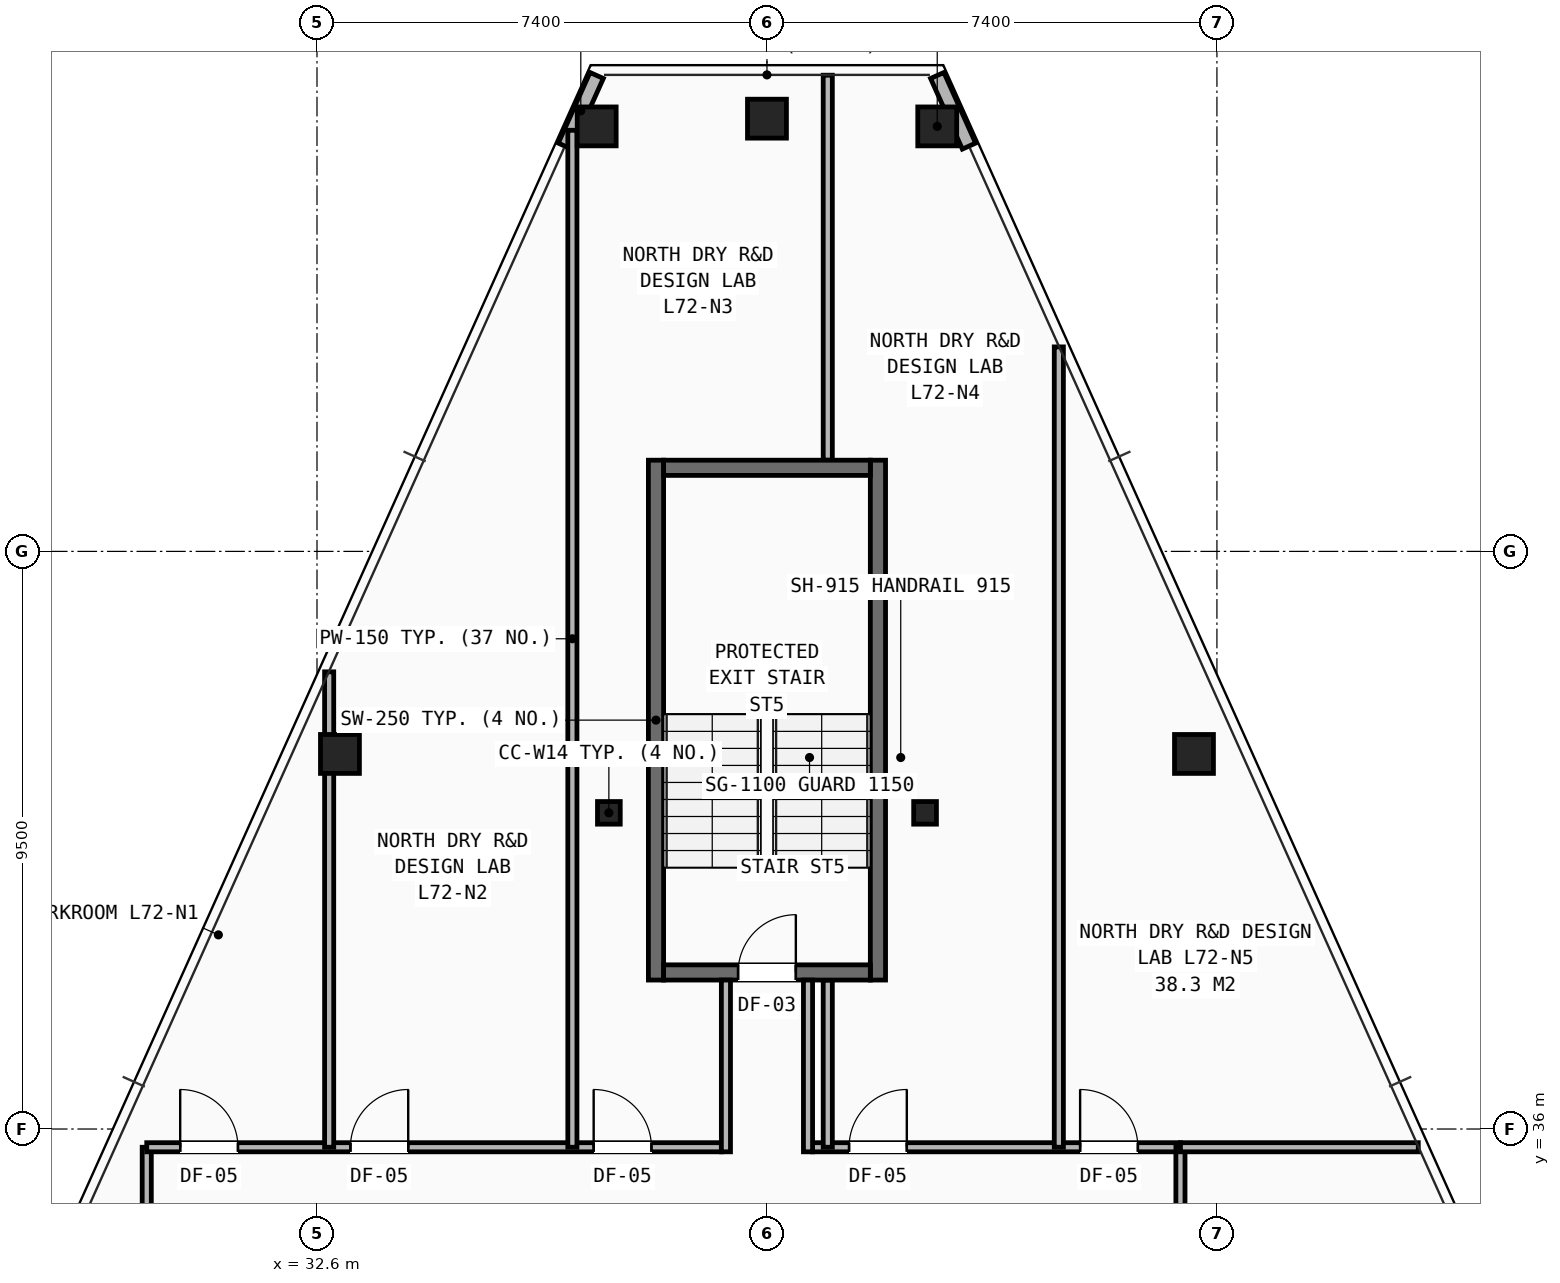
"""IFC4 building model, lengths in metres.
Left out: names, types, materials, properties, quantities, classifications, styles, units other than length and angle.
Written with IfcOpenShell. Run it as: python <this file> out.ifc"""

import sys

from ifc_helpers import new_model, si_unit, direction, frame, frame_2d, origin, origin_2d, place, context, subcontext, project, spatial, rectangle, hollow_rectangle, i_section, extrude, element, fill, save


model = new_model("IFC4")
c1 = context("Model", 3, precision=1e-05, world=origin(), true_north=direction((0.0, 1.0)))
c2 = subcontext(c1, "Body", "Model", "MODEL_VIEW")
j1 = project(units=[si_unit("LENGTHUNIT", "METRE"), si_unit("PLANEANGLEUNIT", "RADIAN")], contexts=[c1])
p1 = place(None, origin())
s1 = spatial("IfcSite", under=j1, at=p1, CompositionType="ELEMENT")
p2 = place(p1, origin())
s2 = spatial("IfcBuilding", under=s1, at=p2, CompositionType="ELEMENT")
p3 = place(p2, frame((0.0, 0.0, 255.0)))
s3 = spatial("IfcBuildingStorey", under=s2, at=p3, CompositionType="ELEMENT", Elevation=255.0)
for number, where, z_axis, x_axis in (
    (1, (37.4, 41.2, 0.0), (0.0, 0.0, 1.0), (1.0, 0.0, 0.0)),
    (2, (42.6, 41.2, 0.0), (0.0, 0.0, 1.0), (1.0, 0.0, 0.0)),
):
    element("IfcColumn", number, at=place(p3, frame(where, z_axis=z_axis, x_axis=x_axis)), inside=s3, PredefinedType="COLUMN", context=c2, shape_type="SweptSolid", body=[
        extrude(i_section(OverallWidth=0.374, OverallDepth=0.372, WebThickness=0.016, FlangeThickness=0.026, at=origin_2d()), origin(), (0.0, 0.0, 1.0), 3.5),
    ])
for number, where, z_axis, x_axis in (
    (3, (42.8, 52.49, 0.0), (0.0, 0.0, 1.0), (1.0, 0.0, 0.0)),
    (4, (40.0, 52.617, 0.0), (0.0, 0.0, 1.0), (1.0, 0.0, 0.0)),
    (5, (37.2, 52.49, 0.0), (0.0, 0.0, 1.0), (1.0, 0.0, 0.0)),
    (6, (32.977, 42.169, 0.0), (0.0, 0.0, 1.0), (1.0, 0.0, 0.0)),
    (7, (47.023, 42.169, 0.0), (0.0, 0.0, 1.0), (1.0, 0.0, 0.0)),
):
    element("IfcColumn", number, at=place(p3, frame(where, z_axis=z_axis, x_axis=x_axis)), inside=s3, PredefinedType="COLUMN", context=c2, shape_type="SweptSolid", body=[
        extrude(hollow_rectangle(XDim=0.64, YDim=0.64, WallThickness=0.045, at=origin_2d()), origin(), (0.0, 0.0, 1.0), 3.5),
    ])
for number, where, z_axis, x_axis in (
    (8, (37.199, 53.328, 0.0), (0.0, 0.0, 1.0), (-0.41, -0.912, 0.0)),
    (9, (43.323, 52.166, 0.0), (0.0, 0.0, 1.0), (-0.41, 0.912, 0.0)),
):
    element("IfcWall", number, at=place(p3, frame(where, z_axis=z_axis, x_axis=x_axis)), inside=s3, PredefinedType="SHEAR", context=c2, shape_type="SweptSolid", body=[
        extrude(rectangle(XDim=1.274, YDim=0.24, at=frame_2d((0.637, 0.0))), origin(), (0.0, 0.0, 1.0), 2.623),
    ])
p4 = place(p3, frame((29.8, 16.4, 0.0), z_axis=(0.0, 0.0, 1.0), x_axis=(0.0, 1.0, 0.0)))
e10 = element("IfcWall", 10, at=p4, inside=s3, PredefinedType="PARTITIONING", context=c2, shape_type="SweptSolid", body=[
    extrude(rectangle(XDim=19.3, YDim=0.15, at=frame_2d((9.65, 0.0))), origin(), (0.0, 0.0, 1.0), 2.292),
])
p5 = place(p4, frame((0.35, 0.0, 0.0)))
e11 = element("IfcOpeningElement", 11, at=p5, cuts=e10, PredefinedType="OPENING", context=c2, shape_type="SweptSolid", body=[
    extrude(rectangle(XDim=0.95, YDim=2.1, at=frame_2d((0.475, 1.05))), frame((0.0, 0.085, 0.0), z_axis=(0.0, -1.0, 0.0), x_axis=(1.0, 0.0, 0.0)), (0.0, 0.0, 1.0), 0.17),
])
p6 = place(p4, frame((2.95, 0.0, 0.0)))
e12 = element("IfcOpeningElement", 12, at=p6, cuts=e10, PredefinedType="OPENING", context=c2, shape_type="SweptSolid", body=[
    extrude(rectangle(XDim=0.95, YDim=2.1, at=frame_2d((0.475, 1.05))), frame((0.0, 0.085, 0.0), z_axis=(0.0, -1.0, 0.0), x_axis=(1.0, 0.0, 0.0)), (0.0, 0.0, 1.0), 0.17),
])
p7 = place(p4, frame((6.15, 0.0, 0.0)))
e13 = element("IfcOpeningElement", 13, at=p7, cuts=e10, PredefinedType="OPENING", context=c2, shape_type="SweptSolid", body=[
    extrude(rectangle(XDim=0.95, YDim=2.1, at=frame_2d((0.475, 1.05))), frame((0.0, 0.085, 0.0), z_axis=(0.0, -1.0, 0.0), x_axis=(1.0, 0.0, 0.0)), (0.0, 0.0, 1.0), 0.17),
])
p8 = place(p4, frame((9.45, 0.0, 0.0)))
e14 = element("IfcOpeningElement", 14, at=p8, cuts=e10, PredefinedType="OPENING", context=c2, shape_type="SweptSolid", body=[
    extrude(rectangle(XDim=0.95, YDim=2.1, at=frame_2d((0.475, 1.05))), frame((0.0, 0.085, 0.0), z_axis=(0.0, -1.0, 0.0), x_axis=(1.0, 0.0, 0.0)), (0.0, 0.0, 1.0), 0.17),
])
p9 = place(p4, frame((12.95, 0.0, 0.0)))
e15 = element("IfcOpeningElement", 15, at=p9, cuts=e10, PredefinedType="OPENING", context=c2, shape_type="SweptSolid", body=[
    extrude(rectangle(XDim=0.95, YDim=2.1, at=frame_2d((0.475, 1.05))), frame((0.0, 0.085, 0.0), z_axis=(0.0, -1.0, 0.0), x_axis=(1.0, 0.0, 0.0)), (0.0, 0.0, 1.0), 0.17),
])
p10 = place(p3, frame((29.8, 35.7, 0.0), z_axis=(0.0, 0.0, 1.0), x_axis=(1.0, 0.0, 0.0)))
e16 = element("IfcWall", 16, at=p10, inside=s3, PredefinedType="PARTITIONING", context=c2, shape_type="SweptSolid", body=[
    extrude(rectangle(XDim=9.45, YDim=0.15, at=frame_2d((4.725, 0.0))), origin(), (0.0, 0.0, 1.0), 2.628),
])
p11 = place(p10, frame((0.55, 0.0, 0.0)))
e17 = element("IfcOpeningElement", 17, at=p11, cuts=e16, PredefinedType="OPENING", context=c2, shape_type="SweptSolid", body=[
    extrude(rectangle(XDim=0.95, YDim=2.1, at=frame_2d((0.475, 1.05))), frame((0.0, 0.085, 0.0), z_axis=(0.0, -1.0, 0.0), x_axis=(1.0, 0.0, 0.0)), (0.0, 0.0, 1.0), 0.17),
])
p12 = place(p10, frame((3.35, 0.0, 0.0)))
e18 = element("IfcOpeningElement", 18, at=p12, cuts=e16, PredefinedType="OPENING", context=c2, shape_type="SweptSolid", body=[
    extrude(rectangle(XDim=0.95, YDim=2.1, at=frame_2d((0.475, 1.05))), frame((0.0, 0.085, 0.0), z_axis=(0.0, -1.0, 0.0), x_axis=(1.0, 0.0, 0.0)), (0.0, 0.0, 1.0), 0.17),
])
p13 = place(p10, frame((7.35, 0.0, 0.0)))
e19 = element("IfcOpeningElement", 19, at=p13, cuts=e16, PredefinedType="OPENING", context=c2, shape_type="SweptSolid", body=[
    extrude(rectangle(XDim=0.95, YDim=2.1, at=frame_2d((0.475, 1.05))), frame((0.0, 0.085, 0.0), z_axis=(0.0, -1.0, 0.0), x_axis=(1.0, 0.0, 0.0)), (0.0, 0.0, 1.0), 0.17),
])
p14 = place(p3, frame((40.75, 35.7, 0.0), z_axis=(0.0, 0.0, 1.0), x_axis=(1.0, 0.0, 0.0)))
e20 = element("IfcWall", 20, at=p14, inside=s3, PredefinedType="PARTITIONING", context=c2, shape_type="SweptSolid", body=[
    extrude(rectangle(XDim=6.05, YDim=0.15, at=frame_2d((3.025, 0.0))), origin(), (0.0, 0.0, 1.0), 3.25),
])
p15 = place(p14, frame((0.6, 0.0, 0.0)))
e21 = element("IfcOpeningElement", 21, at=p15, cuts=e20, PredefinedType="OPENING", context=c2, shape_type="SweptSolid", body=[
    extrude(rectangle(XDim=0.95, YDim=2.1, at=frame_2d((0.475, 1.05))), frame((0.0, 0.085, 0.0), z_axis=(0.0, -1.0, 0.0), x_axis=(1.0, 0.0, 0.0)), (0.0, 0.0, 1.0), 0.17),
])
p16 = place(p14, frame((4.4, 0.0, 0.0)))
e22 = element("IfcOpeningElement", 22, at=p16, cuts=e20, PredefinedType="OPENING", context=c2, shape_type="SweptSolid", body=[
    extrude(rectangle(XDim=0.95, YDim=2.1, at=frame_2d((0.475, 1.05))), frame((0.0, 0.085, 0.0), z_axis=(0.0, -1.0, 0.0), x_axis=(1.0, 0.0, 0.0)), (0.0, 0.0, 1.0), 0.17),
])
p17 = place(p3, frame((46.8, 31.2, 0.0), z_axis=(0.0, 0.0, 1.0), x_axis=(0.0, 1.0, 0.0)))
e23 = element("IfcWall", 23, at=p17, inside=s3, PredefinedType="PARTITIONING", context=c2, shape_type="SweptSolid", body=[
    extrude(rectangle(XDim=4.5, YDim=0.15, at=frame_2d((2.25, 0.0))), origin(), (0.0, 0.0, 1.0), 2.705),
])
p18 = place(p3, frame((46.8, 35.7, 0.0), z_axis=(0.0, 0.0, 1.0), x_axis=(1.0, 0.0, 0.0)))
e24 = element("IfcWall", 24, at=p18, inside=s3, PredefinedType="PARTITIONING", context=c2, shape_type="SweptSolid", body=[
    extrude(rectangle(XDim=3.911, YDim=0.15, at=frame_2d((1.956, 0.0))), origin(), (0.0, 0.0, 1.0), 2.628),
])
p19 = place(p3, frame((32.8, 35.7, 0.0), z_axis=(0.0, 0.0, 1.0), x_axis=(0.0, 1.0, 0.0)))
e25 = element("IfcWall", 25, at=p19, inside=s3, PredefinedType="PARTITIONING", context=c2, shape_type="SweptSolid", body=[
    extrude(rectangle(XDim=7.819, YDim=0.15, at=frame_2d((3.91, 0.0))), origin(), (0.0, 0.0, 1.0), 2.292),
])
p20 = place(p3, frame((36.8, 35.7, 0.0), z_axis=(0.0, 0.0, 1.0), x_axis=(0.0, 1.0, 0.0)))
e26 = element("IfcWall", 26, at=p20, inside=s3, PredefinedType="PARTITIONING", context=c2, shape_type="SweptSolid", body=[
    extrude(rectangle(XDim=16.726, YDim=0.15, at=frame_2d((8.363, 0.0))), origin(), (0.0, 0.0, 1.0), 2.292),
])
p21 = place(p3, frame((41.0, 35.7, 0.0), z_axis=(0.0, 0.0, 1.0), x_axis=(0.0, 1.0, 0.0)))
e27 = element("IfcWall", 27, at=p21, inside=s3, PredefinedType="PARTITIONING", context=c2, shape_type="SweptSolid", body=[
    extrude(rectangle(XDim=2.75, YDim=0.15, at=frame_2d((1.375, 0.0))), origin(), (0.0, 0.0, 1.0), 3.25),
])
p22 = place(p3, frame((41.0, 47.0, 0.0), z_axis=(0.0, 0.0, 1.0), x_axis=(0.0, 1.0, 0.0)))
e28 = element("IfcWall", 28, at=p22, inside=s3, PredefinedType="PARTITIONING", context=c2, shape_type="SweptSolid", body=[
    extrude(rectangle(XDim=6.332, YDim=0.15, at=frame_2d((3.166, 0.0))), origin(), (0.0, 0.0, 1.0), 2.628),
])
p23 = place(p3, frame((44.8, 35.7, 0.0), z_axis=(0.0, 0.0, 1.0), x_axis=(0.0, 1.0, 0.0)))
e29 = element("IfcWall", 29, at=p23, inside=s3, PredefinedType="PARTITIONING", context=c2, shape_type="SweptSolid", body=[
    extrude(rectangle(XDim=13.163, YDim=0.15, at=frame_2d((6.582, 0.0))), origin(), (0.0, 0.0, 1.0), 2.292),
])
for number, where, z_axis, x_axis in (
    (30, (38.175, 38.45, 0.0), (0.0, 0.0, 1.0), (0.0, 1.0, 0.0)),
    (31, (41.825, 38.45, 0.0), (0.0, 0.0, 1.0), (0.0, 1.0, 0.0)),
):
    element("IfcWall", number, at=place(p3, frame(where, z_axis=z_axis, x_axis=x_axis)), inside=s3, PredefinedType="SHEAR", context=c2, shape_type="SweptSolid", body=[
        extrude(rectangle(XDim=8.55, YDim=0.25, at=frame_2d((4.275, 0.0))), origin(), (0.0, 0.0, 1.0), 3.25),
    ])
p24 = place(p3, frame((38.3, 38.575, 0.0), z_axis=(0.0, 0.0, 1.0), x_axis=(1.0, 0.0, 0.0)))
e32 = element("IfcWall", 32, at=p24, inside=s3, PredefinedType="SHEAR", context=c2, shape_type="SweptSolid", body=[
    extrude(rectangle(XDim=3.4, YDim=0.25, at=frame_2d((1.7, 0.0))), origin(), (0.0, 0.0, 1.0), 3.25),
])
p25 = place(p24, frame((1.225, 0.0, 0.0)))
e33 = element("IfcOpeningElement", 33, at=p25, cuts=e32, PredefinedType="OPENING", context=c2, shape_type="SweptSolid", body=[
    extrude(rectangle(XDim=0.95, YDim=2.1, at=frame_2d((0.475, 1.05))), frame((0.0, 0.135, 0.0), z_axis=(0.0, -1.0, 0.0), x_axis=(1.0, 0.0, 0.0)), (0.0, 0.0, 1.0), 0.27),
])
p26 = place(p3, frame((38.3, 46.875, 0.0), z_axis=(0.0, 0.0, 1.0), x_axis=(1.0, 0.0, 0.0)))
e34 = element("IfcWall", 34, at=p26, inside=s3, PredefinedType="SHEAR", context=c2, shape_type="SweptSolid", body=[
    extrude(rectangle(XDim=3.4, YDim=0.25, at=frame_2d((1.7, 0.0))), origin(), (0.0, 0.0, 1.0), 3.25),
])
for number, where, z_axis, x_axis in (
    (35, (39.325, 35.625, 0.0), (0.0, 0.0, 1.0), (0.0, 1.0, 0.0)),
    (36, (40.675, 35.625, 0.0), (0.0, 0.0, 1.0), (0.0, 1.0, 0.0)),
):
    element("IfcWall", number, at=place(p3, frame(where, z_axis=z_axis, x_axis=x_axis)), inside=s3, PredefinedType="PARTITIONING", context=c2, shape_type="SweptSolid", body=[
        extrude(rectangle(XDim=2.825, YDim=0.15, at=frame_2d((1.413, 0.0))), origin(), (0.0, 0.0, 1.0), 3.25),
    ])
p27 = place(p11, origin())
e37 = element("IfcDoor", 37, at=p27, inside=s3, OperationType="SINGLE_SWING_LEFT", PredefinedType="DOOR", context=c2, shape_type="SweptSolid", body=[
    extrude(rectangle(XDim=0.95, YDim=2.1, at=frame_2d((0.475, 1.05))), frame((0.0, 0.025, 0.0), z_axis=(0.0, -1.0, 0.0), x_axis=(1.0, 0.0, 0.0)), (0.0, 0.0, 1.0), 0.05),
])
fill(e17, e37)
p28 = place(p12, origin())
e38 = element("IfcDoor", 38, at=p28, inside=s3, OperationType="SINGLE_SWING_RIGHT", PredefinedType="DOOR", context=c2, shape_type="SweptSolid", body=[
    extrude(rectangle(XDim=0.95, YDim=2.1, at=frame_2d((0.475, 1.05))), frame((0.0, 0.025, 0.0), z_axis=(0.0, -1.0, 0.0), x_axis=(1.0, 0.0, 0.0)), (0.0, 0.0, 1.0), 0.05),
])
fill(e18, e38)
p29 = place(p13, origin())
e39 = element("IfcDoor", 39, at=p29, inside=s3, OperationType="SINGLE_SWING_LEFT", PredefinedType="DOOR", context=c2, shape_type="SweptSolid", body=[
    extrude(rectangle(XDim=0.95, YDim=2.1, at=frame_2d((0.475, 1.05))), frame((0.0, 0.025, 0.0), z_axis=(0.0, -1.0, 0.0), x_axis=(1.0, 0.0, 0.0)), (0.0, 0.0, 1.0), 0.05),
])
fill(e19, e39)
p30 = place(p15, origin())
e40 = element("IfcDoor", 40, at=p30, inside=s3, OperationType="SINGLE_SWING_RIGHT", PredefinedType="DOOR", context=c2, shape_type="SweptSolid", body=[
    extrude(rectangle(XDim=0.95, YDim=2.1, at=frame_2d((0.475, 1.05))), frame((0.0, 0.025, 0.0), z_axis=(0.0, -1.0, 0.0), x_axis=(1.0, 0.0, 0.0)), (0.0, 0.0, 1.0), 0.05),
])
fill(e21, e40)
p31 = place(p16, origin())
e41 = element("IfcDoor", 41, at=p31, inside=s3, OperationType="SINGLE_SWING_LEFT", PredefinedType="DOOR", context=c2, shape_type="SweptSolid", body=[
    extrude(rectangle(XDim=0.95, YDim=2.1, at=frame_2d((0.475, 1.05))), frame((0.0, 0.025, 0.0), z_axis=(0.0, -1.0, 0.0), x_axis=(1.0, 0.0, 0.0)), (0.0, 0.0, 1.0), 0.05),
])
fill(e22, e41)
p32 = place(p25, origin())
e42 = element("IfcDoor", 42, at=p32, inside=s3, OperationType="SINGLE_SWING_RIGHT", PredefinedType="DOOR", context=c2, shape_type="SweptSolid", body=[
    extrude(rectangle(XDim=0.95, YDim=2.1, at=frame_2d((0.475, 1.05))), frame((0.0, 0.025, 0.0), z_axis=(0.0, -1.0, 0.0), x_axis=(1.0, 0.0, 0.0)), (0.0, 0.0, 1.0), 0.05),
])
fill(e33, e42)
save(model, sys.argv[1])
